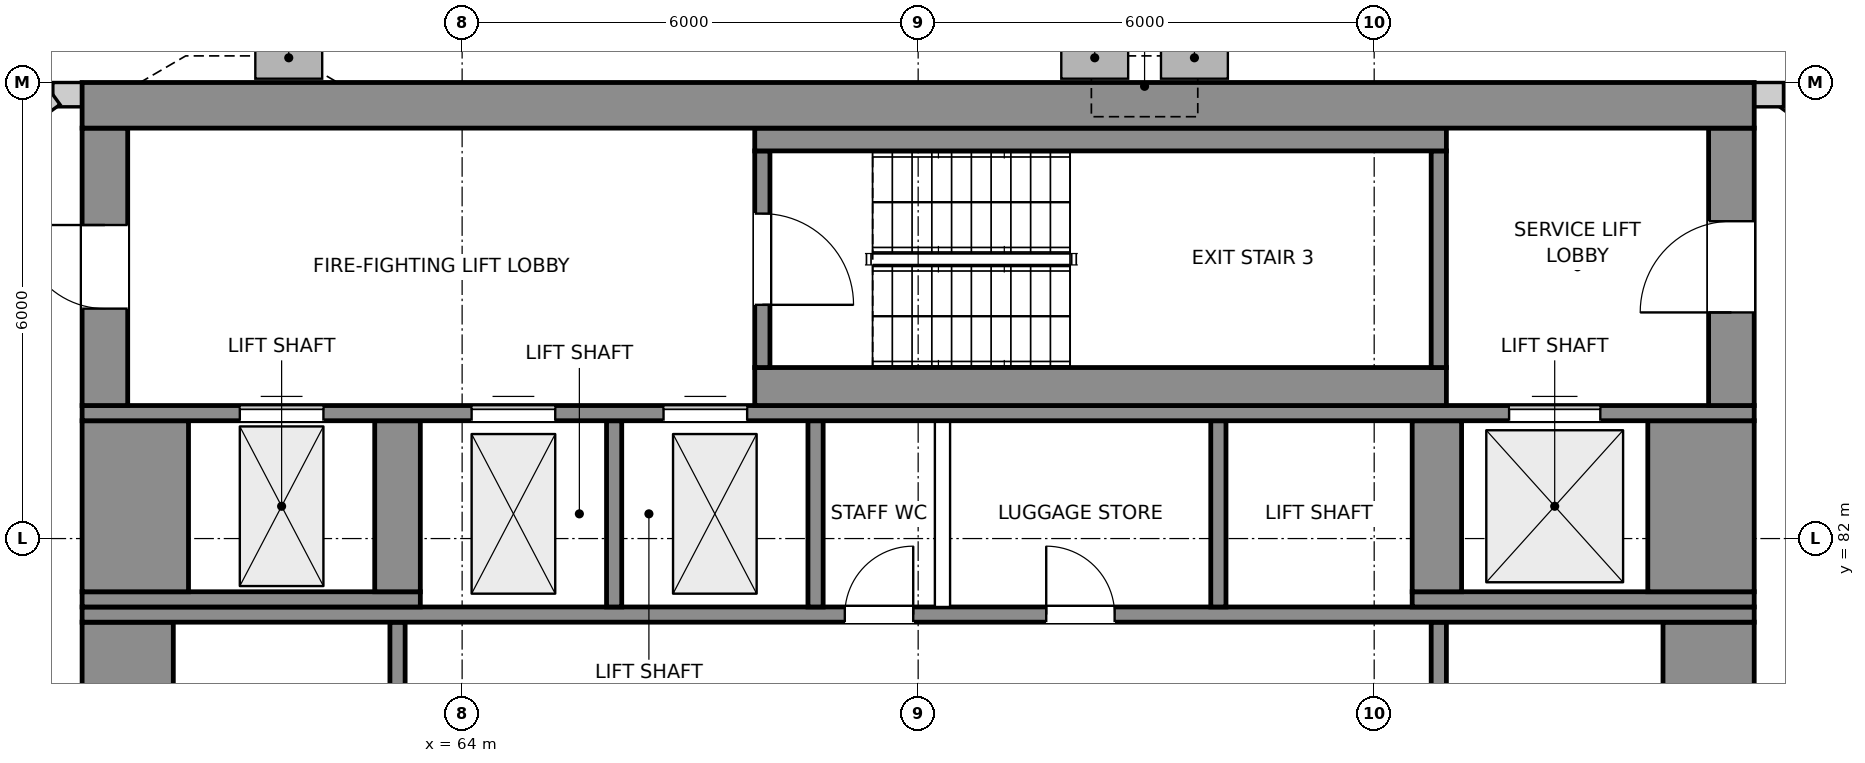
"""IFC4 building model, lengths in metres.
Left out: names, types, materials, properties, quantities, classifications, styles, units other than length and angle.
Written with IfcOpenShell. Run it as: python <this file> out.ifc"""

import sys

from ifc_helpers import new_model, si_unit, direction, frame, frame_2d, origin, place, context, subcontext, project, spatial, rectangle, extrude, element, fill, save


model = new_model("IFC4")
c1 = context("Model", 3, precision=1e-05, world=origin(), true_north=direction((0.0, 1.0)))
c2 = subcontext(c1, "Body", "Model", "MODEL_VIEW")
j1 = project(units=[si_unit("LENGTHUNIT", "METRE"), si_unit("PLANEANGLEUNIT", "RADIAN")], contexts=[c1])
p1 = place(None, origin())
s1 = spatial("IfcSite", under=j1, at=p1, CompositionType="ELEMENT")
p2 = place(p1, origin())
s2 = spatial("IfcBuilding", under=s1, at=p2, CompositionType="ELEMENT")
p3 = place(p2, frame((0.0, 0.0, 317.8)))
s3 = spatial("IfcBuildingStorey", under=s2, at=p3, CompositionType="ELEMENT", Elevation=317.8)
p4 = place(p3, frame((86.521, 84.109, 0.0), z_axis=(0.0, 0.0, 1.0), x_axis=(-0.809013740323, 0.587789731084, 0.0)))
e1 = element("IfcWall", 1, at=p4, inside=s3, PredefinedType="SOLIDWALL", context=c2, shape_type="SweptSolid", body=[
    extrude(rectangle(XDim=6.348, YDim=0.32, at=frame_2d((3.174, 0.0))), origin(), (0.0, 0.0, 1.0), 3.5),
])
p5 = place(p4, frame((2.274, 0.0, 0.9)))
e2 = element("IfcOpeningElement", 2, at=p5, cuts=e1, PredefinedType="OPENING", context=c2, shape_type="SweptSolid", body=[
    extrude(rectangle(XDim=1.6, YDim=1.8, at=frame_2d((0.8, 0.9))), frame((0.0, 0.17, 0.0), z_axis=(0.0, -1.0, 0.0), x_axis=(1.0, 0.0, 0.0)), (0.0, 0.0, 1.0), 0.34),
])
for number, where, z_axis, x_axis in (
    (3, (81.385, 87.84, 0.0), (0.0, 0.0, 1.0), (-1.0, 0.0, 0.0)),
    (4, (59.0, 87.84, 0.0), (0.0, 0.0, 1.0), (-1.0, 0.0, 0.0)),
):
    element("IfcWall", number, at=place(p3, frame(where, z_axis=z_axis, x_axis=x_axis)), inside=s3, PredefinedType="SOLIDWALL", context=c2, shape_type="SweptSolid", body=[
        extrude(rectangle(XDim=0.385, YDim=0.32, at=frame_2d((0.192, 0.0))), origin(), (0.0, 0.0, 1.0), 3.5),
    ])
p6 = place(p3, frame((58.615, 87.84, 0.0), z_axis=(0.0, 0.0, 1.0), x_axis=(-0.809013740323, -0.587789731084, 0.0)))
e5 = element("IfcWall", 5, at=p6, inside=s3, PredefinedType="SOLIDWALL", context=c2, shape_type="SweptSolid", body=[
    extrude(rectangle(XDim=6.348, YDim=0.32, at=frame_2d((3.174, 0.0))), origin(), (0.0, 0.0, 1.0), 3.5),
])
p7 = place(p6, frame((2.46, 0.0, 0.9)))
e6 = element("IfcOpeningElement", 6, at=p7, cuts=e5, PredefinedType="OPENING", context=c2, shape_type="SweptSolid", body=[
    extrude(rectangle(XDim=1.6, YDim=1.8, at=frame_2d((0.8, 0.9))), frame((0.0, 0.17, 0.0), z_axis=(0.0, -1.0, 0.0), x_axis=(1.0, 0.0, 0.0)), (0.0, 0.0, 1.0), 0.34),
])
for number, where, z_axis, x_axis in (
    (7, (59.6, 71.6, 0.0), (0.0, 0.0, 1.0), (0.0, 1.0, 0.0)),
    (8, (80.4, 71.6, 0.0), (0.0, 0.0, 1.0), (0.0, 1.0, 0.0)),
):
    element("IfcWall", number, at=place(p3, frame(where, z_axis=z_axis, x_axis=x_axis)), inside=s3, PredefinedType="SHEAR", context=c2, shape_type="SweptSolid", body=[
        extrude(rectangle(XDim=9.3, YDim=1.2, at=frame_2d((4.65, 0.0))), origin(), (0.0, 0.0, 1.0), 3.9),
    ])
for number, where, z_axis, x_axis in (
    (9, (63.15, 77.7, 0.0), (0.0, 0.0, 1.0), (0.0, 1.0, 0.0)),
    (10, (76.85, 77.7, 0.0), (0.0, 0.0, 1.0), (0.0, 1.0, 0.0)),
):
    element("IfcWall", number, at=place(p3, frame(where, z_axis=z_axis, x_axis=x_axis)), inside=s3, PredefinedType="SHEAR", context=c2, shape_type="SweptSolid", body=[
        extrude(rectangle(XDim=3.2, YDim=0.2, at=frame_2d((1.6, 0.0))), origin(), (0.0, 0.0, 1.0), 3.9),
    ])
p8 = place(p3, frame((59.0, 81.0, 0.0), z_axis=(0.0, 0.0, 1.0), x_axis=(1.0, 0.0, 0.0)))
e11 = element("IfcWall", 11, at=p8, inside=s3, PredefinedType="SHEAR", context=c2, shape_type="SweptSolid", body=[
    extrude(rectangle(XDim=22.0, YDim=0.2, at=frame_2d((11.0, 0.0))), origin(), (0.0, 0.0, 1.0), 3.9),
])
p9 = place(p8, frame((10.035, 0.0, 0.0)))
e12 = element("IfcOpeningElement", 12, at=p9, cuts=e11, PredefinedType="OPENING", context=c2, shape_type="SweptSolid", body=[
    extrude(rectangle(XDim=0.9, YDim=2.1, at=frame_2d((0.45, 1.05))), frame((0.0, 0.11, 0.0), z_axis=(0.0, -1.0, 0.0), x_axis=(1.0, 0.0, 0.0)), (0.0, 0.0, 1.0), 0.22),
])
p10 = place(p8, frame((12.685, 0.0, 0.0)))
e13 = element("IfcOpeningElement", 13, at=p10, cuts=e11, PredefinedType="OPENING", context=c2, shape_type="SweptSolid", body=[
    extrude(rectangle(XDim=0.9, YDim=2.1, at=frame_2d((0.45, 1.05))), frame((0.0, 0.11, 0.0), z_axis=(0.0, -1.0, 0.0), x_axis=(1.0, 0.0, 0.0)), (0.0, 0.0, 1.0), 0.22),
])
p11 = place(p3, frame((59.0, 81.2, 0.0), z_axis=(0.0, 0.0, 1.0), x_axis=(1.0, 0.0, 0.0)))
e14 = element("IfcWall", 14, at=p11, inside=s3, PredefinedType="SHEAR", context=c2, shape_type="SweptSolid", body=[
    extrude(rectangle(XDim=4.45, YDim=0.2, at=frame_2d((2.225, 0.0))), origin(), (0.0, 0.0, 1.0), 3.9),
])
for number, where, z_axis, x_axis in (
    (15, (66.0, 81.1, 0.0), (0.0, 0.0, 1.0), (0.0, 1.0, 0.0)),
    (16, (68.65, 81.1, 0.0), (0.0, 0.0, 1.0), (0.0, 1.0, 0.0)),
):
    element("IfcWall", number, at=place(p3, frame(where, z_axis=z_axis, x_axis=x_axis)), inside=s3, PredefinedType="SHEAR", context=c2, shape_type="SweptSolid", body=[
        extrude(rectangle(XDim=2.45, YDim=0.2, at=frame_2d((1.225, 0.0))), origin(), (0.0, 0.0, 1.0), 3.9),
    ])
p12 = place(p3, frame((70.32, 81.1, 0.0), z_axis=(0.0, 0.0, 1.0), x_axis=(0.0, 1.0, 0.0)))
e17 = element("IfcWall", 17, at=p12, inside=s3, PredefinedType="PARTITIONING", context=c2, shape_type="SweptSolid", body=[
    extrude(rectangle(XDim=2.45, YDim=0.2, at=frame_2d((1.225, 0.0))), origin(), (0.0, 0.0, 1.0), 3.5),
])
p13 = place(p3, frame((73.95, 81.1, 0.0), z_axis=(0.0, 0.0, 1.0), x_axis=(0.0, 1.0, 0.0)))
e18 = element("IfcWall", 18, at=p13, inside=s3, PredefinedType="SHEAR", context=c2, shape_type="SweptSolid", body=[
    extrude(rectangle(XDim=2.45, YDim=0.2, at=frame_2d((1.225, 0.0))), origin(), (0.0, 0.0, 1.0), 3.9),
])
p14 = place(p3, frame((76.5, 81.2, 0.0), z_axis=(0.0, 0.0, 1.0), x_axis=(1.0, 0.0, 0.0)))
e19 = element("IfcWall", 19, at=p14, inside=s3, PredefinedType="SHEAR", context=c2, shape_type="SweptSolid", body=[
    extrude(rectangle(XDim=4.5, YDim=0.2, at=frame_2d((2.25, 0.0))), origin(), (0.0, 0.0, 1.0), 3.9),
])
p15 = place(p3, frame((59.7, 81.3, 0.0), z_axis=(0.0, 0.0, 1.0), x_axis=(0.0, 1.0, 0.0)))
e20 = element("IfcWall", 20, at=p15, inside=s3, PredefinedType="SHEAR", context=c2, shape_type="SweptSolid", body=[
    extrude(rectangle(XDim=2.25, YDim=1.4, at=frame_2d((1.125, 0.0))), origin(), (0.0, 0.0, 1.0), 3.9),
])
p16 = place(p3, frame((63.15, 81.3, 0.0), z_axis=(0.0, 0.0, 1.0), x_axis=(0.0, 1.0, 0.0)))
e21 = element("IfcWall", 21, at=p16, inside=s3, PredefinedType="SHEAR", context=c2, shape_type="SweptSolid", body=[
    extrude(rectangle(XDim=2.25, YDim=0.6, at=frame_2d((1.125, 0.0))), origin(), (0.0, 0.0, 1.0), 3.9),
])
p17 = place(p3, frame((76.825, 81.3, 0.0), z_axis=(0.0, 0.0, 1.0), x_axis=(0.0, 1.0, 0.0)))
e22 = element("IfcWall", 22, at=p17, inside=s3, PredefinedType="SHEAR", context=c2, shape_type="SweptSolid", body=[
    extrude(rectangle(XDim=2.25, YDim=0.65, at=frame_2d((1.125, 0.0))), origin(), (0.0, 0.0, 1.0), 3.9),
])
p18 = place(p3, frame((80.3, 81.3, 0.0), z_axis=(0.0, 0.0, 1.0), x_axis=(0.0, 1.0, 0.0)))
e23 = element("IfcWall", 23, at=p18, inside=s3, PredefinedType="SHEAR", context=c2, shape_type="SweptSolid", body=[
    extrude(rectangle(XDim=2.25, YDim=1.4, at=frame_2d((1.125, 0.0))), origin(), (0.0, 0.0, 1.0), 3.9),
])
p19 = place(p3, frame((59.0, 83.65, 0.0), z_axis=(0.0, 0.0, 1.0), x_axis=(1.0, 0.0, 0.0)))
e24 = element("IfcWall", 24, at=p19, inside=s3, PredefinedType="SHEAR", context=c2, shape_type="SweptSolid", body=[
    extrude(rectangle(XDim=22.0, YDim=0.2, at=frame_2d((11.0, 0.0))), origin(), (0.0, 0.0, 1.0), 3.9),
])
p20 = place(p19, frame((5.125, 0.0, 0.0)))
e25 = element("IfcOpeningElement", 25, at=p20, cuts=e24, PredefinedType="OPENING", context=c2, shape_type="SweptSolid", body=[
    extrude(rectangle(XDim=1.1, YDim=2.1, at=frame_2d((0.55, 1.05))), frame((0.0, 0.11, 0.0), z_axis=(0.0, -1.0, 0.0), x_axis=(1.0, 0.0, 0.0)), (0.0, 0.0, 1.0), 0.22),
])
p21 = place(p19, frame((7.65, 0.0, 0.0)))
e26 = element("IfcOpeningElement", 26, at=p21, cuts=e24, PredefinedType="OPENING", context=c2, shape_type="SweptSolid", body=[
    extrude(rectangle(XDim=1.1, YDim=2.1, at=frame_2d((0.55, 1.05))), frame((0.0, 0.11, 0.0), z_axis=(0.0, -1.0, 0.0), x_axis=(1.0, 0.0, 0.0)), (0.0, 0.0, 1.0), 0.22),
])
p22 = place(p19, frame((18.775, 0.0, 0.0)))
e27 = element("IfcOpeningElement", 27, at=p22, cuts=e24, PredefinedType="OPENING", context=c2, shape_type="SweptSolid", body=[
    extrude(rectangle(XDim=1.2, YDim=2.1, at=frame_2d((0.6, 1.05))), frame((0.0, 0.11, 0.0), z_axis=(0.0, -1.0, 0.0), x_axis=(1.0, 0.0, 0.0)), (0.0, 0.0, 1.0), 0.22),
])
p23 = place(p19, frame((2.075, 0.0, 0.0)))
e28 = element("IfcOpeningElement", 28, at=p23, cuts=e24, PredefinedType="OPENING", context=c2, shape_type="SweptSolid", body=[
    extrude(rectangle(XDim=1.1, YDim=2.1, at=frame_2d((0.55, 1.05))), frame((0.0, 0.11, 0.0), z_axis=(0.0, -1.0, 0.0), x_axis=(1.0, 0.0, 0.0)), (0.0, 0.0, 1.0), 0.22),
])
p24 = place(p3, frame((59.3, 83.75, 0.0), z_axis=(0.0, 0.0, 1.0), x_axis=(0.0, 1.0, 0.0)))
e29 = element("IfcWall", 29, at=p24, inside=s3, PredefinedType="SHEAR", context=c2, shape_type="SweptSolid", body=[
    extrude(rectangle(XDim=3.65, YDim=0.6, at=frame_2d((1.825, 0.0))), origin(), (0.0, 0.0, 1.0), 3.9),
])
p25 = place(p24, frame((1.275, 0.0, 0.0)))
e30 = element("IfcOpeningElement", 30, at=p25, cuts=e29, PredefinedType="OPENING", context=c2, shape_type="SweptSolid", body=[
    extrude(rectangle(XDim=1.1, YDim=2.1, at=frame_2d((0.55, 1.05))), frame((0.0, 0.31, 0.0), z_axis=(0.0, -1.0, 0.0), x_axis=(1.0, 0.0, 0.0)), (0.0, 0.0, 1.0), 0.62),
])
p26 = place(p3, frame((67.85, 84.0, 0.0), z_axis=(0.0, 0.0, 1.0), x_axis=(1.0, 0.0, 0.0)))
e31 = element("IfcWall", 31, at=p26, inside=s3, PredefinedType="SHEAR", context=c2, shape_type="SweptSolid", body=[
    extrude(rectangle(XDim=9.1, YDim=0.5, at=frame_2d((4.55, 0.0))), origin(), (0.0, 0.0, 1.0), 3.9),
])
p27 = place(p3, frame((80.7, 83.75, 0.0), z_axis=(0.0, 0.0, 1.0), x_axis=(0.0, 1.0, 0.0)))
e32 = element("IfcWall", 32, at=p27, inside=s3, PredefinedType="SHEAR", context=c2, shape_type="SweptSolid", body=[
    extrude(rectangle(XDim=3.65, YDim=0.6, at=frame_2d((1.825, 0.0))), origin(), (0.0, 0.0, 1.0), 3.9),
])
p28 = place(p27, frame((1.225, 0.0, 0.0)))
e33 = element("IfcOpeningElement", 33, at=p28, cuts=e32, PredefinedType="OPENING", context=c2, shape_type="SweptSolid", body=[
    extrude(rectangle(XDim=1.2, YDim=2.1, at=frame_2d((0.6, 1.05))), frame((0.0, 0.31, 0.0), z_axis=(0.0, -1.0, 0.0), x_axis=(1.0, 0.0, 0.0)), (0.0, 0.0, 1.0), 0.62),
])
p29 = place(p3, frame((67.95, 84.25, 0.0), z_axis=(0.0, 0.0, 1.0), x_axis=(0.0, 1.0, 0.0)))
e34 = element("IfcWall", 34, at=p29, inside=s3, PredefinedType="SHEAR", context=c2, shape_type="SweptSolid", body=[
    extrude(rectangle(XDim=2.85, YDim=0.2, at=frame_2d((1.425, 0.0))), origin(), (0.0, 0.0, 1.0), 3.9),
])
p30 = place(p29, frame((0.825, 0.0, 0.0)))
e35 = element("IfcOpeningElement", 35, at=p30, cuts=e34, PredefinedType="OPENING", context=c2, shape_type="SweptSolid", body=[
    extrude(rectangle(XDim=1.2, YDim=2.1, at=frame_2d((0.6, 1.05))), frame((0.0, 0.11, 0.0), z_axis=(0.0, -1.0, 0.0), x_axis=(1.0, 0.0, 0.0)), (0.0, 0.0, 1.0), 0.22),
])
p31 = place(p3, frame((76.85, 84.25, 0.0), z_axis=(0.0, 0.0, 1.0), x_axis=(0.0, 1.0, 0.0)))
e36 = element("IfcWall", 36, at=p31, inside=s3, PredefinedType="SHEAR", context=c2, shape_type="SweptSolid", body=[
    extrude(rectangle(XDim=2.85, YDim=0.2, at=frame_2d((1.425, 0.0))), origin(), (0.0, 0.0, 1.0), 3.9),
])
p32 = place(p3, frame((67.85, 87.25, 0.0), z_axis=(0.0, 0.0, 1.0), x_axis=(1.0, 0.0, 0.0)))
e37 = element("IfcWall", 37, at=p32, inside=s3, PredefinedType="SHEAR", context=c2, shape_type="SweptSolid", body=[
    extrude(rectangle(XDim=9.1, YDim=0.3, at=frame_2d((4.55, 0.0))), origin(), (0.0, 0.0, 1.0), 3.9),
])
p33 = place(p3, frame((59.0, 87.7, 0.0), z_axis=(0.0, 0.0, 1.0), x_axis=(1.0, 0.0, 0.0)))
e38 = element("IfcWall", 38, at=p33, inside=s3, PredefinedType="SHEAR", context=c2, shape_type="SweptSolid", body=[
    extrude(rectangle(XDim=22.0, YDim=0.6, at=frame_2d((11.0, 0.0))), origin(), (0.0, 0.0, 1.0), 3.9),
])
p34 = place(p30, frame((1.2, 0.0, 0.0), z_axis=(0.0, 0.0, 1.0), x_axis=(-1.0, 0.0, 0.0)))
e39 = element("IfcDoor", 39, at=p34, inside=s3, OperationType="SINGLE_SWING_RIGHT", PredefinedType="DOOR", context=c2, shape_type="SweptSolid", body=[
    extrude(rectangle(XDim=1.2, YDim=2.1, at=frame_2d((0.6, 1.05))), frame((0.0, 0.025, 0.0), z_axis=(0.0, -1.0, 0.0), x_axis=(1.0, 0.0, 0.0)), (0.0, 0.0, 1.0), 0.05),
])
fill(e35, e39)
p35 = place(p25, origin())
e40 = element("IfcDoor", 40, at=p35, inside=s3, OperationType="SINGLE_SWING_RIGHT", PredefinedType="DOOR", context=c2, shape_type="SweptSolid", body=[
    extrude(rectangle(XDim=1.1, YDim=2.1, at=frame_2d((0.55, 1.05))), frame((0.0, 0.025, 0.0), z_axis=(0.0, -1.0, 0.0), x_axis=(1.0, 0.0, 0.0)), (0.0, 0.0, 1.0), 0.05),
])
fill(e30, e40)
p36 = place(p28, origin())
e41 = element("IfcDoor", 41, at=p36, inside=s3, OperationType="SINGLE_SWING_LEFT", PredefinedType="DOOR", context=c2, shape_type="SweptSolid", body=[
    extrude(rectangle(XDim=1.2, YDim=2.1, at=frame_2d((0.6, 1.05))), frame((0.0, 0.025, 0.0), z_axis=(0.0, -1.0, 0.0), x_axis=(1.0, 0.0, 0.0)), (0.0, 0.0, 1.0), 0.05),
])
fill(e33, e41)
p37 = place(p20, origin())
e42 = element("IfcDoor", 42, at=p37, inside=s3, OperationType="DOUBLE_DOOR_SLIDING", PredefinedType="DOOR", context=c2, shape_type="SweptSolid", body=[
    extrude(rectangle(XDim=1.1, YDim=2.1, at=frame_2d((0.55, 1.05))), frame((0.0, 0.025, 0.0), z_axis=(0.0, -1.0, 0.0), x_axis=(1.0, 0.0, 0.0)), (0.0, 0.0, 1.0), 0.05),
])
fill(e25, e42)
p38 = place(p21, origin())
e43 = element("IfcDoor", 43, at=p38, inside=s3, OperationType="DOUBLE_DOOR_SLIDING", PredefinedType="DOOR", context=c2, shape_type="SweptSolid", body=[
    extrude(rectangle(XDim=1.1, YDim=2.1, at=frame_2d((0.55, 1.05))), frame((0.0, 0.025, 0.0), z_axis=(0.0, -1.0, 0.0), x_axis=(1.0, 0.0, 0.0)), (0.0, 0.0, 1.0), 0.05),
])
fill(e26, e43)
p39 = place(p22, origin())
e44 = element("IfcDoor", 44, at=p39, inside=s3, OperationType="DOUBLE_DOOR_SLIDING", PredefinedType="DOOR", context=c2, shape_type="SweptSolid", body=[
    extrude(rectangle(XDim=1.2, YDim=2.1, at=frame_2d((0.6, 1.05))), frame((0.0, 0.025, 0.0), z_axis=(0.0, -1.0, 0.0), x_axis=(1.0, 0.0, 0.0)), (0.0, 0.0, 1.0), 0.05),
])
fill(e27, e44)
p40 = place(p23, origin())
e45 = element("IfcDoor", 45, at=p40, inside=s3, OperationType="DOUBLE_DOOR_SLIDING", PredefinedType="DOOR", context=c2, shape_type="SweptSolid", body=[
    extrude(rectangle(XDim=1.1, YDim=2.1, at=frame_2d((0.55, 1.05))), frame((0.0, 0.025, 0.0), z_axis=(0.0, -1.0, 0.0), x_axis=(1.0, 0.0, 0.0)), (0.0, 0.0, 1.0), 0.05),
])
fill(e28, e45)
p41 = place(p9, origin())
e46 = element("IfcDoor", 46, at=p41, inside=s3, OperationType="SINGLE_SWING_RIGHT", PredefinedType="DOOR", context=c2, shape_type="SweptSolid", body=[
    extrude(rectangle(XDim=0.9, YDim=2.1, at=frame_2d((0.45, 1.05))), frame((0.0, 0.025, 0.0), z_axis=(0.0, -1.0, 0.0), x_axis=(1.0, 0.0, 0.0)), (0.0, 0.0, 1.0), 0.05),
])
fill(e12, e46)
p42 = place(p10, origin())
e47 = element("IfcDoor", 47, at=p42, inside=s3, OperationType="SINGLE_SWING_LEFT", PredefinedType="DOOR", context=c2, shape_type="SweptSolid", body=[
    extrude(rectangle(XDim=0.9, YDim=2.1, at=frame_2d((0.45, 1.05))), frame((0.0, 0.025, 0.0), z_axis=(0.0, -1.0, 0.0), x_axis=(1.0, 0.0, 0.0)), (0.0, 0.0, 1.0), 0.05),
])
fill(e13, e47)
save(model, sys.argv[1])
